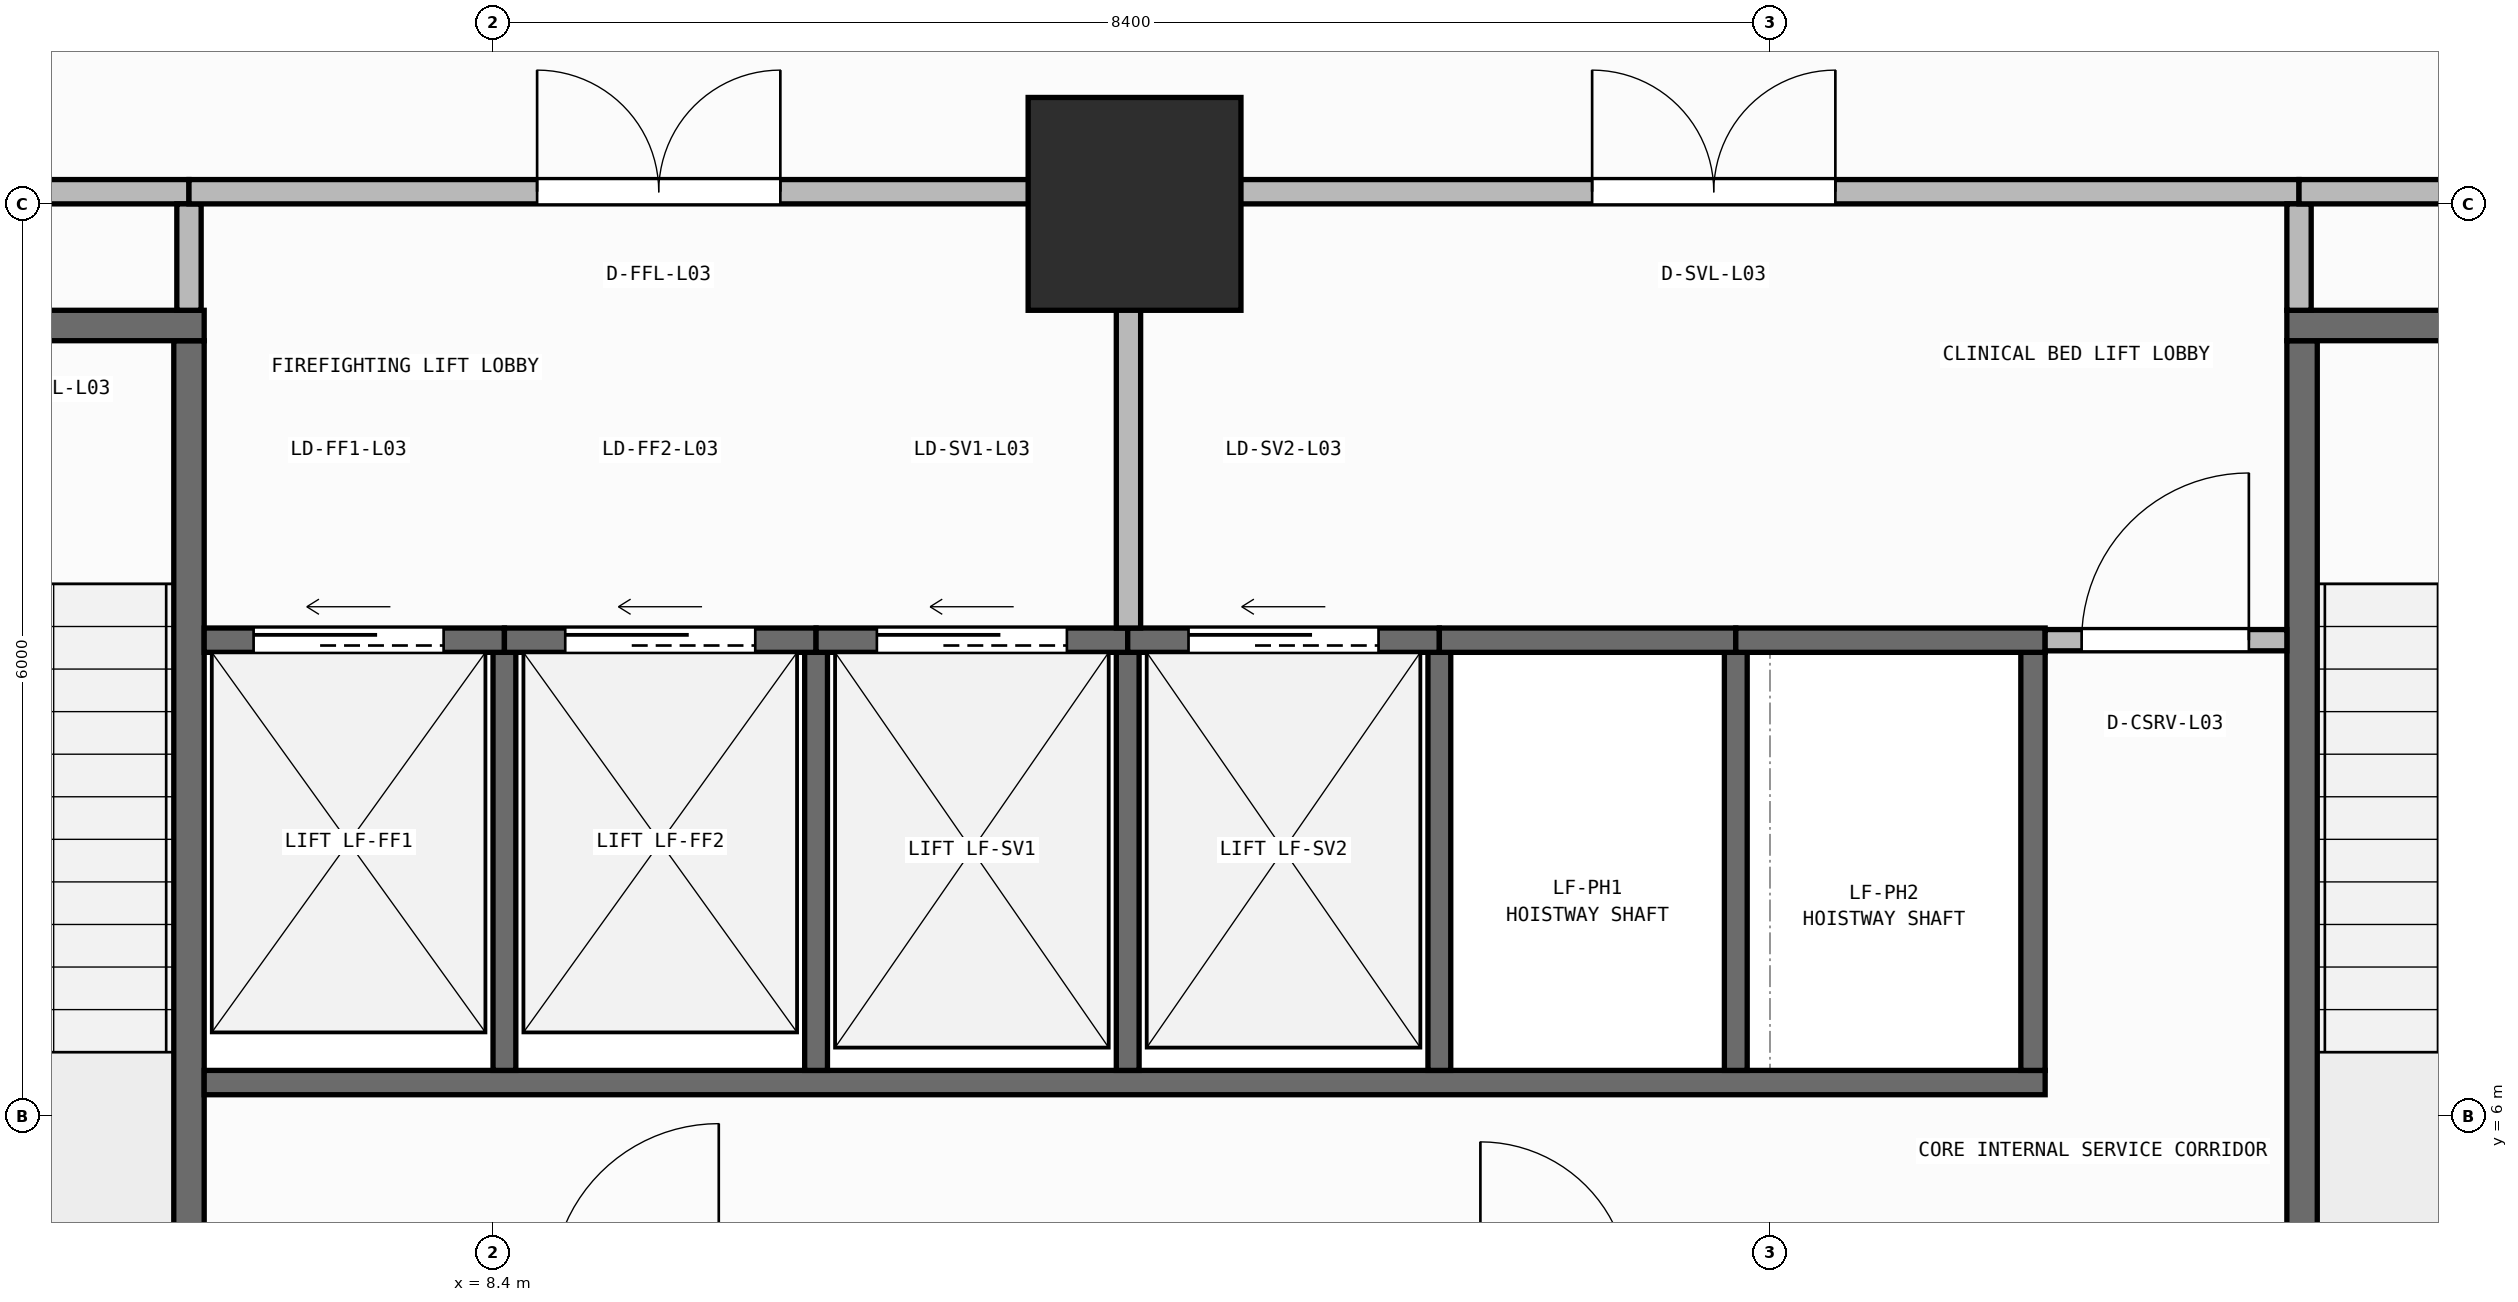
"""IFC4 building model, lengths in metres.
Left out: names, types, materials, properties, quantities, classifications, styles, units other than length and angle.
Written with IfcOpenShell. Run it as: python <this file> out.ifc"""

import sys

from ifc_helpers import new_model, si_unit, direction, frame, frame_2d, origin, origin_2d, place, context, subcontext, project, spatial, rectangle, extrude, element, fill, save


model = new_model("IFC4")
c1 = context("Model", 3, precision=1e-05, world=origin(), true_north=direction((0.0, 1.0)))
c2 = subcontext(c1, "Body", "Model", "MODEL_VIEW")
j1 = project(units=[si_unit("LENGTHUNIT", "METRE"), si_unit("PLANEANGLEUNIT", "RADIAN")], contexts=[c1])
p1 = place(None, origin())
s1 = spatial("IfcSite", under=j1, at=p1, CompositionType="ELEMENT")
p2 = place(p1, origin())
s2 = spatial("IfcBuilding", under=s1, at=p2, CompositionType="ELEMENT")
p3 = place(p2, frame((0.0, 0.0, 13.5)))
s3 = spatial("IfcBuildingStorey", under=s2, at=p3, CompositionType="ELEMENT", Elevation=13.5)
p4 = place(p3, frame((12.62, 12.0, 0.0), z_axis=(0.0, 0.0, 1.0), x_axis=(1.0, 0.0, 0.0)))
e1 = element("IfcColumn", 1, at=p4, inside=s3, PredefinedType="COLUMN", context=c2, shape_type="SweptSolid", body=[
    extrude(rectangle(XDim=1.4, YDim=1.4, at=origin_2d()), origin(), (0.0, 0.0, 1.0), 4.5),
])
p5 = place(p3, frame((6.4, 3.5, 0.0), z_axis=(0.0, 0.0, 1.0), x_axis=(0.0, 1.0, 0.0)))
e2 = element("IfcWall", 2, at=p5, inside=s3, PredefinedType="SHEAR", context=c2, shape_type="SweptSolid", body=[
    extrude(rectangle(XDim=7.6, YDim=0.2, at=frame_2d((3.8, 0.0))), origin(), (0.0, 0.0, 1.0), 4.25),
])
p6 = place(p3, frame((2.8, 11.2, 0.0), z_axis=(0.0, 0.0, 1.0), x_axis=(1.0, 0.0, 0.0)))
e3 = element("IfcWall", 3, at=p6, inside=s3, PredefinedType="SHEAR", context=c2, shape_type="SweptSolid", body=[
    extrude(rectangle(XDim=3.7, YDim=0.2, at=frame_2d((1.85, 0.0))), origin(), (0.0, 0.0, 1.0), 4.25),
])
p7 = place(p6, frame((1.2, 0.0, 0.0)))
e4 = element("IfcOpeningElement", 4, at=p7, cuts=e3, PredefinedType="OPENING", context=c2, shape_type="SweptSolid", body=[
    extrude(rectangle(XDim=1.3, YDim=2.15, at=frame_2d((0.65, 1.075))), frame((0.0, 0.11, 0.0), z_axis=(0.0, -1.0, 0.0), x_axis=(1.0, 0.0, 0.0)), (0.0, 0.0, 1.0), 0.22),
])
p8 = place(p3, frame((20.3, 3.5, 0.0), z_axis=(0.0, 0.0, 1.0), x_axis=(0.0, 1.0, 0.0)))
e5 = element("IfcWall", 5, at=p8, inside=s3, PredefinedType="SHEAR", context=c2, shape_type="SweptSolid", body=[
    extrude(rectangle(XDim=7.6, YDim=0.2, at=frame_2d((3.8, 0.0))), origin(), (0.0, 0.0, 1.0), 4.25),
])
p9 = place(p3, frame((20.2, 11.2, 0.0), z_axis=(0.0, 0.0, 1.0), x_axis=(1.0, 0.0, 0.0)))
e6 = element("IfcWall", 6, at=p9, inside=s3, PredefinedType="SHEAR", context=c2, shape_type="SweptSolid", body=[
    extrude(rectangle(XDim=3.7, YDim=0.2, at=frame_2d((1.85, 0.0))), origin(), (0.0, 0.0, 1.0), 4.25),
])
p10 = place(p9, frame((1.2, 0.0, 0.0)))
e7 = element("IfcOpeningElement", 7, at=p10, cuts=e6, PredefinedType="OPENING", context=c2, shape_type="SweptSolid", body=[
    extrude(rectangle(XDim=1.3, YDim=2.15, at=frame_2d((0.65, 1.075))), frame((0.0, 0.11, 0.0), z_axis=(0.0, -1.0, 0.0), x_axis=(1.0, 0.0, 0.0)), (0.0, 0.0, 1.0), 0.22),
])
p11 = place(p3, frame((6.5, 6.22, 0.0), z_axis=(0.0, 0.0, 1.0), x_axis=(1.0, 0.0, 0.0)))
e8 = element("IfcWall", 8, at=p11, inside=s3, PredefinedType="SHEAR", context=c2, shape_type="SweptSolid", body=[
    extrude(rectangle(XDim=12.11, YDim=0.16, at=frame_2d((6.055, 0.0))), origin(), (0.0, 0.0, 1.0), 4.25),
])
p12 = place(p3, frame((18.53, 6.3, 0.0), z_axis=(0.0, 0.0, 1.0), x_axis=(0.0, 1.0, 0.0)))
e9 = element("IfcWall", 9, at=p12, inside=s3, PredefinedType="SHEAR", context=c2, shape_type="SweptSolid", body=[
    extrude(rectangle(XDim=2.75, YDim=0.16, at=frame_2d((1.375, 0.0))), origin(), (0.0, 0.0, 1.0), 4.25),
])
for number, where, z_axis, x_axis in (
    (10, (8.475, 6.3, 0.0), (0.0, 0.0, 1.0), (0.0, 1.0, 0.0)),
    (11, (10.525, 6.3, 0.0), (0.0, 0.0, 1.0), (0.0, 1.0, 0.0)),
    (12, (12.575, 6.3, 0.0), (0.0, 0.0, 1.0), (0.0, 1.0, 0.0)),
    (13, (14.625, 6.3, 0.0), (0.0, 0.0, 1.0), (0.0, 1.0, 0.0)),
    (14, (16.575, 6.3, 0.0), (0.0, 0.0, 1.0), (0.0, 1.0, 0.0)),
):
    element("IfcWall", number, at=place(p3, frame(where, z_axis=z_axis, x_axis=x_axis)), inside=s3, PredefinedType="SHEAR", context=c2, shape_type="SweptSolid", body=[
        extrude(rectangle(XDim=2.75, YDim=0.15, at=frame_2d((1.375, 0.0))), origin(), (0.0, 0.0, 1.0), 4.25),
    ])
p13 = place(p3, frame((6.5, 9.13, 0.0), z_axis=(0.0, 0.0, 1.0), x_axis=(1.0, 0.0, 0.0)))
e15 = element("IfcWall", 15, at=p13, inside=s3, PredefinedType="SHEAR", context=c2, shape_type="SweptSolid", body=[
    extrude(rectangle(XDim=1.975, YDim=0.16, at=frame_2d((0.988, 0.0))), origin(), (0.0, 0.0, 1.0), 4.25),
])
p14 = place(p13, frame((0.325, 0.0, 0.0)))
e16 = element("IfcOpeningElement", 16, at=p14, cuts=e15, PredefinedType="OPENING", context=c2, shape_type="SweptSolid", body=[
    extrude(rectangle(XDim=1.25, YDim=2.15, at=frame_2d((0.625, 1.075))), frame((0.0, 0.09, 0.0), z_axis=(0.0, -1.0, 0.0), x_axis=(1.0, 0.0, 0.0)), (0.0, 0.0, 1.0), 0.18),
])
p15 = place(p3, frame((8.475, 9.13, 0.0), z_axis=(0.0, 0.0, 1.0), x_axis=(1.0, 0.0, 0.0)))
e17 = element("IfcWall", 17, at=p15, inside=s3, PredefinedType="SHEAR", context=c2, shape_type="SweptSolid", body=[
    extrude(rectangle(XDim=2.05, YDim=0.16, at=frame_2d((1.025, 0.0))), origin(), (0.0, 0.0, 1.0), 4.25),
])
p16 = place(p15, frame((0.4, 0.0, 0.0)))
e18 = element("IfcOpeningElement", 18, at=p16, cuts=e17, PredefinedType="OPENING", context=c2, shape_type="SweptSolid", body=[
    extrude(rectangle(XDim=1.25, YDim=2.15, at=frame_2d((0.625, 1.075))), frame((0.0, 0.09, 0.0), z_axis=(0.0, -1.0, 0.0), x_axis=(1.0, 0.0, 0.0)), (0.0, 0.0, 1.0), 0.18),
])
p17 = place(p3, frame((10.525, 9.13, 0.0), z_axis=(0.0, 0.0, 1.0), x_axis=(1.0, 0.0, 0.0)))
e19 = element("IfcWall", 19, at=p17, inside=s3, PredefinedType="SHEAR", context=c2, shape_type="SweptSolid", body=[
    extrude(rectangle(XDim=2.05, YDim=0.16, at=frame_2d((1.025, 0.0))), origin(), (0.0, 0.0, 1.0), 4.25),
])
p18 = place(p17, frame((0.4, 0.0, 0.0)))
e20 = element("IfcOpeningElement", 20, at=p18, cuts=e19, PredefinedType="OPENING", context=c2, shape_type="SweptSolid", body=[
    extrude(rectangle(XDim=1.25, YDim=2.15, at=frame_2d((0.625, 1.075))), frame((0.0, 0.09, 0.0), z_axis=(0.0, -1.0, 0.0), x_axis=(1.0, 0.0, 0.0)), (0.0, 0.0, 1.0), 0.18),
])
p19 = place(p3, frame((12.575, 9.13, 0.0), z_axis=(0.0, 0.0, 1.0), x_axis=(1.0, 0.0, 0.0)))
e21 = element("IfcWall", 21, at=p19, inside=s3, PredefinedType="SHEAR", context=c2, shape_type="SweptSolid", body=[
    extrude(rectangle(XDim=2.05, YDim=0.16, at=frame_2d((1.025, 0.0))), origin(), (0.0, 0.0, 1.0), 4.25),
])
p20 = place(p19, frame((0.4, 0.0, 0.0)))
e22 = element("IfcOpeningElement", 22, at=p20, cuts=e21, PredefinedType="OPENING", context=c2, shape_type="SweptSolid", body=[
    extrude(rectangle(XDim=1.25, YDim=2.15, at=frame_2d((0.625, 1.075))), frame((0.0, 0.09, 0.0), z_axis=(0.0, -1.0, 0.0), x_axis=(1.0, 0.0, 0.0)), (0.0, 0.0, 1.0), 0.18),
])
p21 = place(p3, frame((14.625, 9.13, 0.0), z_axis=(0.0, 0.0, 1.0), x_axis=(1.0, 0.0, 0.0)))
e23 = element("IfcWall", 23, at=p21, inside=s3, PredefinedType="SHEAR", context=c2, shape_type="SweptSolid", body=[
    extrude(rectangle(XDim=1.95, YDim=0.16, at=frame_2d((0.975, 0.0))), origin(), (0.0, 0.0, 1.0), 4.25),
])
p22 = place(p3, frame((16.575, 9.13, 0.0), z_axis=(0.0, 0.0, 1.0), x_axis=(1.0, 0.0, 0.0)))
e24 = element("IfcWall", 24, at=p22, inside=s3, PredefinedType="SHEAR", context=c2, shape_type="SweptSolid", body=[
    extrude(rectangle(XDim=2.035, YDim=0.16, at=frame_2d((1.018, 0.0))), origin(), (0.0, 0.0, 1.0), 4.25),
])
p23 = place(p3, frame((18.61, 9.13, 0.0), z_axis=(0.0, 0.0, 1.0), x_axis=(1.0, 0.0, 0.0)))
e25 = element("IfcWall", 25, at=p23, inside=s3, PredefinedType="PARTITIONING", context=c2, shape_type="SweptSolid", body=[
    extrude(rectangle(XDim=1.59, YDim=0.14, at=frame_2d((0.795, 0.0))), origin(), (0.0, 0.0, 1.0), 4.25),
])
p24 = place(p23, frame((0.24, 0.0, 0.0)))
e26 = element("IfcOpeningElement", 26, at=p24, cuts=e25, PredefinedType="OPENING", context=c2, shape_type="SweptSolid", body=[
    extrude(rectangle(XDim=1.1, YDim=2.1, at=frame_2d((0.55, 1.05))), frame((0.0, 0.08, 0.0), z_axis=(0.0, -1.0, 0.0), x_axis=(1.0, 0.0, 0.0)), (0.0, 0.0, 1.0), 0.16),
])
p25 = place(p3, frame((2.8, 12.08, 0.0), z_axis=(0.0, 0.0, 1.0), x_axis=(1.0, 0.0, 0.0)))
e27 = element("IfcWall", 27, at=p25, inside=s3, PredefinedType="PARTITIONING", context=c2, shape_type="SweptSolid", body=[
    extrude(rectangle(XDim=3.6, YDim=0.16, at=frame_2d((1.8, 0.0))), origin(), (0.0, 0.0, 1.0), 3.425),
])
p26 = place(p25, frame((1.0, 0.0, 0.0)))
e28 = element("IfcOpeningElement", 28, at=p26, cuts=e27, PredefinedType="OPENING", context=c2, shape_type="SweptSolid", body=[
    extrude(rectangle(XDim=1.6, YDim=2.05, at=frame_2d((0.8, 1.025))), frame((0.0, 0.09, 0.0), z_axis=(0.0, -1.0, 0.0), x_axis=(1.0, 0.0, 0.0)), (0.0, 0.0, 1.0), 0.18),
])
p27 = place(p3, frame((6.4, 11.3, 0.0), z_axis=(0.0, 0.0, 1.0), x_axis=(0.0, 1.0, 0.0)))
e29 = element("IfcWall", 29, at=p27, inside=s3, PredefinedType="PARTITIONING", context=c2, shape_type="SweptSolid", body=[
    extrude(rectangle(XDim=0.7, YDim=0.16, at=frame_2d((0.35, 0.0))), origin(), (0.0, 0.0, 1.0), 4.25),
])
p28 = place(p3, frame((6.4, 12.08, 0.0), z_axis=(0.0, 0.0, 1.0), x_axis=(1.0, 0.0, 0.0)))
e30 = element("IfcWall", 30, at=p28, inside=s3, PredefinedType="PARTITIONING", context=c2, shape_type="SweptSolid", body=[
    extrude(rectangle(XDim=6.18, YDim=0.16, at=frame_2d((3.09, 0.0))), origin(), (0.0, 0.0, 1.0), 3.425),
])
p29 = place(p28, frame((2.29, 0.0, 0.0)))
e31 = element("IfcOpeningElement", 31, at=p29, cuts=e30, PredefinedType="OPENING", context=c2, shape_type="SweptSolid", body=[
    extrude(rectangle(XDim=1.6, YDim=2.05, at=frame_2d((0.8, 1.025))), frame((0.0, 0.09, 0.0), z_axis=(0.0, -1.0, 0.0), x_axis=(1.0, 0.0, 0.0)), (0.0, 0.0, 1.0), 0.18),
])
p30 = place(p3, frame((12.58, 9.21, 0.0), z_axis=(0.0, 0.0, 1.0), x_axis=(0.0, 1.0, 0.0)))
e32 = element("IfcWall", 32, at=p30, inside=s3, PredefinedType="PARTITIONING", context=c2, shape_type="SweptSolid", body=[
    extrude(rectangle(XDim=2.79, YDim=0.16, at=frame_2d((1.395, 0.0))), origin(), (0.0, 0.0, 1.0), 4.25),
])
p31 = place(p3, frame((12.58, 12.08, 0.0), z_axis=(0.0, 0.0, 1.0), x_axis=(1.0, 0.0, 0.0)))
e33 = element("IfcWall", 33, at=p31, inside=s3, PredefinedType="PARTITIONING", context=c2, shape_type="SweptSolid", body=[
    extrude(rectangle(XDim=7.7, YDim=0.16, at=frame_2d((3.85, 0.0))), origin(), (0.0, 0.0, 1.0), 3.425),
])
p32 = place(p31, frame((3.05, 0.0, 0.0)))
e34 = element("IfcOpeningElement", 34, at=p32, cuts=e33, PredefinedType="OPENING", context=c2, shape_type="SweptSolid", body=[
    extrude(rectangle(XDim=1.6, YDim=2.05, at=frame_2d((0.8, 1.025))), frame((0.0, 0.09, 0.0), z_axis=(0.0, -1.0, 0.0), x_axis=(1.0, 0.0, 0.0)), (0.0, 0.0, 1.0), 0.18),
])
p33 = place(p3, frame((20.28, 11.3, 0.0), z_axis=(0.0, 0.0, 1.0), x_axis=(0.0, 1.0, 0.0)))
e35 = element("IfcWall", 35, at=p33, inside=s3, PredefinedType="PARTITIONING", context=c2, shape_type="SweptSolid", body=[
    extrude(rectangle(XDim=0.7, YDim=0.16, at=frame_2d((0.35, 0.0))), origin(), (0.0, 0.0, 1.0), 4.25),
])
p34 = place(p3, frame((20.28, 12.08, 0.0), z_axis=(0.0, 0.0, 1.0), x_axis=(1.0, 0.0, 0.0)))
e36 = element("IfcWall", 36, at=p34, inside=s3, PredefinedType="PARTITIONING", context=c2, shape_type="SweptSolid", body=[
    extrude(rectangle(XDim=3.62, YDim=0.16, at=frame_2d((1.81, 0.0))), origin(), (0.0, 0.0, 1.0), 3.425),
])
p35 = place(p34, frame((1.01, 0.0, 0.0)))
e37 = element("IfcOpeningElement", 37, at=p35, cuts=e36, PredefinedType="OPENING", context=c2, shape_type="SweptSolid", body=[
    extrude(rectangle(XDim=1.6, YDim=2.05, at=frame_2d((0.8, 1.025))), frame((0.0, 0.09, 0.0), z_axis=(0.0, -1.0, 0.0), x_axis=(1.0, 0.0, 0.0)), (0.0, 0.0, 1.0), 0.18),
])
p36 = place(p14, origin())
e38 = element("IfcDoor", 38, at=p36, inside=s3, OperationType="SLIDING_TO_LEFT", PredefinedType="DOOR", context=c2, shape_type="SweptSolid", body=[
    extrude(rectangle(XDim=1.25, YDim=2.15, at=frame_2d((0.625, 1.075))), frame((0.0, 0.025, 0.0), z_axis=(0.0, -1.0, 0.0), x_axis=(1.0, 0.0, 0.0)), (0.0, 0.0, 1.0), 0.05),
])
fill(e16, e38)
p37 = place(p16, origin())
e39 = element("IfcDoor", 39, at=p37, inside=s3, OperationType="SLIDING_TO_LEFT", PredefinedType="DOOR", context=c2, shape_type="SweptSolid", body=[
    extrude(rectangle(XDim=1.25, YDim=2.15, at=frame_2d((0.625, 1.075))), frame((0.0, 0.025, 0.0), z_axis=(0.0, -1.0, 0.0), x_axis=(1.0, 0.0, 0.0)), (0.0, 0.0, 1.0), 0.05),
])
fill(e18, e39)
p38 = place(p18, origin())
e40 = element("IfcDoor", 40, at=p38, inside=s3, OperationType="SLIDING_TO_LEFT", PredefinedType="DOOR", context=c2, shape_type="SweptSolid", body=[
    extrude(rectangle(XDim=1.25, YDim=2.15, at=frame_2d((0.625, 1.075))), frame((0.0, 0.025, 0.0), z_axis=(0.0, -1.0, 0.0), x_axis=(1.0, 0.0, 0.0)), (0.0, 0.0, 1.0), 0.05),
])
fill(e20, e40)
p39 = place(p20, origin())
e41 = element("IfcDoor", 41, at=p39, inside=s3, OperationType="SLIDING_TO_LEFT", PredefinedType="DOOR", context=c2, shape_type="SweptSolid", body=[
    extrude(rectangle(XDim=1.25, YDim=2.15, at=frame_2d((0.625, 1.075))), frame((0.0, 0.025, 0.0), z_axis=(0.0, -1.0, 0.0), x_axis=(1.0, 0.0, 0.0)), (0.0, 0.0, 1.0), 0.05),
])
fill(e22, e41)
p40 = place(p24, origin())
e42 = element("IfcDoor", 42, at=p40, inside=s3, OperationType="SINGLE_SWING_RIGHT", PredefinedType="DOOR", context=c2, shape_type="SweptSolid", body=[
    extrude(rectangle(XDim=1.1, YDim=2.1, at=frame_2d((0.55, 1.05))), frame((0.0, 0.025, 0.0), z_axis=(0.0, -1.0, 0.0), x_axis=(1.0, 0.0, 0.0)), (0.0, 0.0, 1.0), 0.05),
])
fill(e26, e42)
p41 = place(p29, origin())
e43 = element("IfcDoor", 43, at=p41, inside=s3, OperationType="DOUBLE_DOOR_SINGLE_SWING", PredefinedType="DOOR", context=c2, shape_type="SweptSolid", body=[
    extrude(rectangle(XDim=1.6, YDim=2.05, at=frame_2d((0.8, 1.025))), frame((0.0, 0.025, 0.0), z_axis=(0.0, -1.0, 0.0), x_axis=(1.0, 0.0, 0.0)), (0.0, 0.0, 1.0), 0.05),
])
fill(e31, e43)
p42 = place(p32, origin())
e44 = element("IfcDoor", 44, at=p42, inside=s3, OperationType="DOUBLE_DOOR_SINGLE_SWING", PredefinedType="DOOR", context=c2, shape_type="SweptSolid", body=[
    extrude(rectangle(XDim=1.6, YDim=2.05, at=frame_2d((0.8, 1.025))), frame((0.0, 0.025, 0.0), z_axis=(0.0, -1.0, 0.0), x_axis=(1.0, 0.0, 0.0)), (0.0, 0.0, 1.0), 0.05),
])
fill(e34, e44)
save(model, sys.argv[1])
